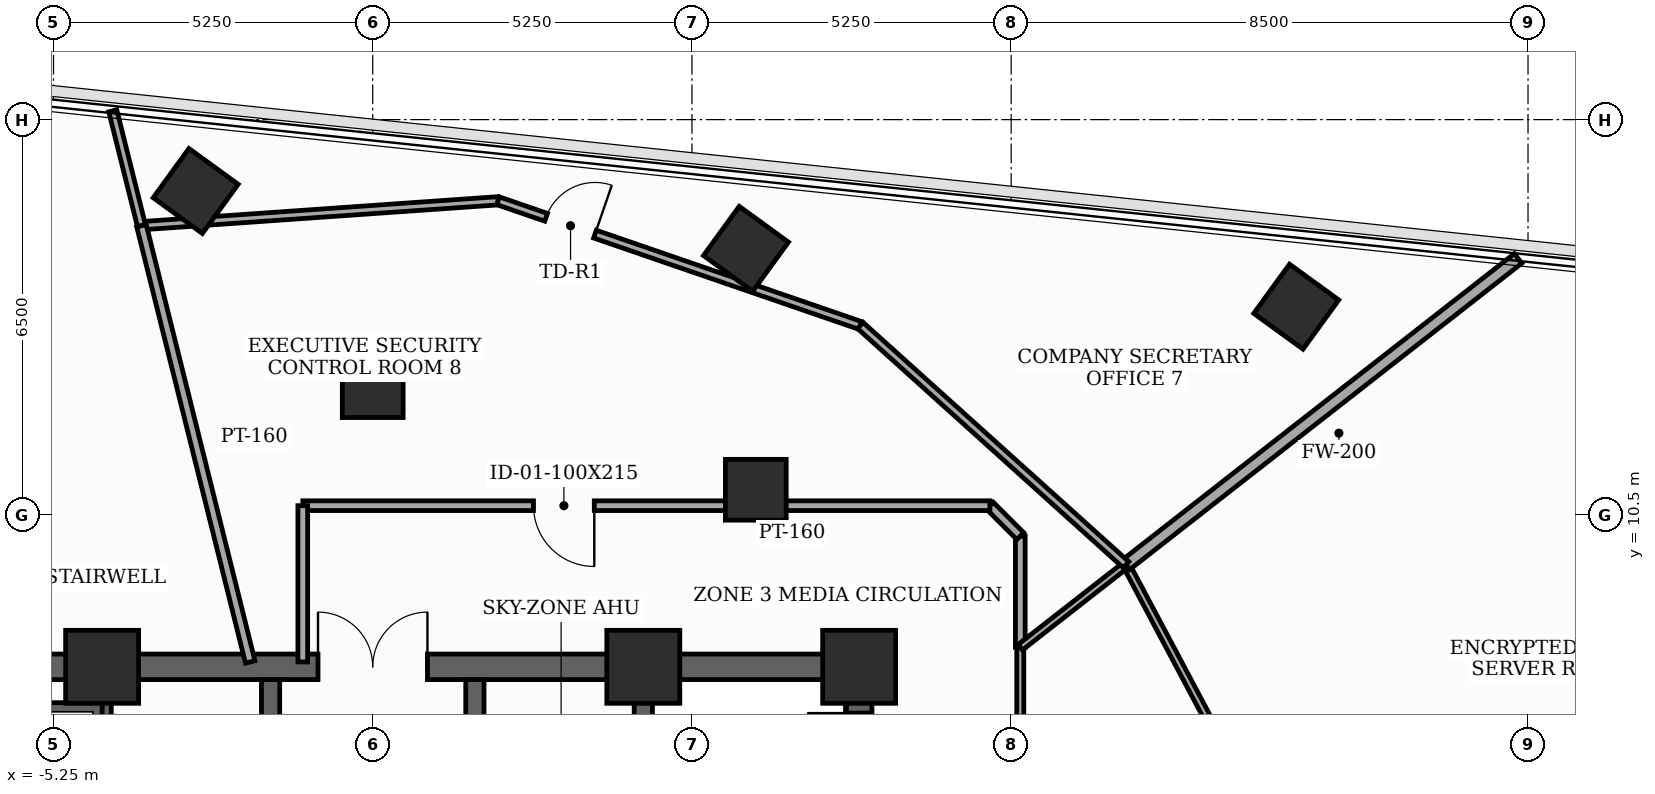
"""IFC4 building model, lengths in metres.
Left out: names, types, materials, properties, quantities, classifications, styles, units other than length and angle.
Written with IfcOpenShell. Run it as: python <this file> out.ifc"""

import sys

from ifc_helpers import new_model, si_unit, direction, frame, frame_2d, origin, origin_2d, place, context, subcontext, project, spatial, rectangle, extrude, element, fill, save


model = new_model("IFC4")
c1 = context("Model", 3, precision=1e-05, world=origin(), true_north=direction((0.0, 1.0)))
c2 = subcontext(c1, "Body", "Model", "MODEL_VIEW")
j1 = project(units=[si_unit("LENGTHUNIT", "METRE"), si_unit("PLANEANGLEUNIT", "RADIAN")], contexts=[c1])
p1 = place(None, origin())
s1 = spatial("IfcSite", under=j1, at=p1, CompositionType="ELEMENT")
p2 = place(p1, origin())
s2 = spatial("IfcBuilding", under=s1, at=p2, CompositionType="ELEMENT")
p3 = place(p2, frame((0.0, 0.0, 222.6)))
s3 = spatial("IfcBuildingStorey", under=s2, at=p3, CompositionType="ELEMENT", Elevation=222.6)
for number, where, z_axis, x_axis in (
    (1, (8.0, 8.0, 0.0), (0.0, 0.0, 1.0), (1.0, 0.0, 0.0)),
    (2, (4.45, 8.0, 0.0), (0.0, 0.0, 1.0), (1.0, 0.0, 0.0)),
    (3, (-4.45, 8.0, 0.0), (0.0, 0.0, 1.0), (1.0, 0.0, 0.0)),
):
    element("IfcColumn", number, at=place(p3, frame(where, z_axis=z_axis, x_axis=x_axis)), inside=s3, PredefinedType="COLUMN", context=c2, shape_type="SweptSolid", body=[
        extrude(rectangle(XDim=1.2, YDim=1.2, at=origin_2d()), origin(), (0.0, 0.0, 1.0), 3.7),
    ])
for number, where, z_axis, x_axis in (
    (4, (6.3, 10.912, 0.0), (0.0, 0.0, 1.0), (1.0, 0.0, 0.0)),
    (5, (0.0, 12.6, 0.0), (0.0, 0.0, 1.0), (1.0, 0.0, 0.0)),
    (6, (15.188, 13.923, 0.0), (0.0, 0.0, 1.0), (0.588, 0.809, 0.0)),
    (7, (6.138, 14.875, 0.0), (0.0, 0.0, 1.0), (0.588, 0.809, 0.0)),
    (8, (-2.912, 15.826, 0.0), (0.0, 0.0, 1.0), (0.588, 0.809, 0.0)),
):
    element("IfcColumn", number, at=place(p3, frame(where, z_axis=z_axis, x_axis=x_axis)), inside=s3, PredefinedType="COLUMN", context=c2, shape_type="SweptSolid", body=[
        extrude(rectangle(XDim=1.0, YDim=1.0, at=origin_2d()), origin(), (0.0, 0.0, 1.0), 3.7),
    ])
p4 = place(p3, frame((8.0, -8.0, 0.0), z_axis=(0.0, 0.0, 1.0), x_axis=(0.0, 1.0, 0.0)))
e9 = element("IfcWall", 9, at=p4, inside=s3, PredefinedType="SHEAR", context=c2, shape_type="SweptSolid", body=[
    extrude(rectangle(XDim=16.0, YDim=0.42, at=frame_2d((8.0, 0.0))), origin(), (0.0, 0.0, 1.0), 3.5),
])
p5 = place(p4, frame((9.6, 0.0, 0.0)))
e10 = element("IfcOpeningElement", 10, at=p5, cuts=e9, PredefinedType="OPENING", context=c2, shape_type="SweptSolid", body=[
    extrude(rectangle(XDim=1.05, YDim=2.15, at=frame_2d((0.525, 1.075))), frame((0.0, 0.22, 0.0), z_axis=(0.0, -1.0, 0.0), x_axis=(1.0, 0.0, 0.0)), (0.0, 0.0, 1.0), 0.44),
])
p6 = place(p4, frame((14.389, 0.0, 0.0)))
e11 = element("IfcOpeningElement", 11, at=p6, cuts=e9, PredefinedType="OPENING", context=c2, shape_type="SweptSolid", body=[
    extrude(rectangle(XDim=0.85, YDim=2.02, at=frame_2d((0.425, 1.01))), frame((0.0, 0.22, 0.0), z_axis=(0.0, -1.0, 0.0), x_axis=(1.0, 0.0, 0.0)), (0.0, 0.0, 1.0), 0.44),
])
p7 = place(p3, frame((-8.0, 8.0, 0.0), z_axis=(0.0, 0.0, 1.0), x_axis=(1.0, 0.0, 0.0)))
e12 = element("IfcWall", 12, at=p7, inside=s3, PredefinedType="SHEAR", context=c2, shape_type="SweptSolid", body=[
    extrude(rectangle(XDim=16.0, YDim=0.42, at=frame_2d((8.0, 0.0))), origin(), (0.0, 0.0, 1.0), 3.5),
])
p8 = place(p7, frame((7.1, 0.0, 0.0)))
e13 = element("IfcOpeningElement", 13, at=p8, cuts=e12, PredefinedType="OPENING", context=c2, shape_type="SweptSolid", body=[
    extrude(rectangle(XDim=1.8, YDim=2.15, at=frame_2d((0.9, 1.075))), frame((0.0, 0.22, 0.0), z_axis=(0.0, -1.0, 0.0), x_axis=(1.0, 0.0, 0.0)), (0.0, 0.0, 1.0), 0.44),
])
for number, where, z_axis, x_axis in (
    (14, (-4.45, -7.79, 0.0), (0.0, 0.0, 1.0), (0.0, 1.0, 0.0)),
    (15, (4.45, -7.79, 0.0), (0.0, 0.0, 1.0), (0.0, 1.0, 0.0)),
):
    element("IfcWall", number, at=place(p3, frame(where, z_axis=z_axis, x_axis=x_axis)), inside=s3, PredefinedType="SHEAR", context=c2, shape_type="SweptSolid", body=[
        extrude(rectangle(XDim=15.58, YDim=0.3, at=frame_2d((7.79, 0.0))), origin(), (0.0, 0.0, 1.0), 3.5),
    ])
p9 = place(p3, frame((-7.79, 7.26, 0.0), z_axis=(0.0, 0.0, 1.0), x_axis=(1.0, 0.0, 0.0)))
e16 = element("IfcWall", 16, at=p9, inside=s3, PredefinedType="SHEAR", context=c2, shape_type="SweptSolid", body=[
    extrude(rectangle(XDim=3.34, YDim=0.3, at=frame_2d((1.67, 0.0))), origin(), (0.0, 0.0, 1.0), 3.5),
])
p10 = place(p3, frame((-1.68, -4.85, 0.0), z_axis=(0.0, 0.0, 1.0), x_axis=(0.0, 1.0, 0.0)))
e17 = element("IfcWall", 17, at=p10, inside=s3, PredefinedType="SHEAR", context=c2, shape_type="SweptSolid", body=[
    extrude(rectangle(XDim=12.64, YDim=0.3, at=frame_2d((6.32, 0.0))), origin(), (0.0, 0.0, 1.0), 3.5),
])
p11 = place(p10, frame((2.6, 0.0, 0.0)))
e18 = element("IfcOpeningElement", 18, at=p11, cuts=e17, PredefinedType="OPENING", context=c2, shape_type="SweptSolid", body=[
    extrude(rectangle(XDim=0.95, YDim=2.1, at=frame_2d((0.475, 1.05))), frame((0.0, 0.16, 0.0), z_axis=(0.0, -1.0, 0.0), x_axis=(1.0, 0.0, 0.0)), (0.0, 0.0, 1.0), 0.32),
])
p12 = place(p10, frame((8.8, 0.0, 0.0)))
e19 = element("IfcOpeningElement", 19, at=p12, cuts=e17, PredefinedType="OPENING", context=c2, shape_type="SweptSolid", body=[
    extrude(rectangle(XDim=0.95, YDim=2.1, at=frame_2d((0.475, 1.05))), frame((0.0, 0.16, 0.0), z_axis=(0.0, -1.0, 0.0), x_axis=(1.0, 0.0, 0.0)), (0.0, 0.0, 1.0), 0.32),
])
p13 = place(p3, frame((1.68, -4.85, 0.0), z_axis=(0.0, 0.0, 1.0), x_axis=(0.0, 1.0, 0.0)))
e20 = element("IfcWall", 20, at=p13, inside=s3, PredefinedType="SHEAR", context=c2, shape_type="SweptSolid", body=[
    extrude(rectangle(XDim=12.64, YDim=0.3, at=frame_2d((6.32, 0.0))), origin(), (0.0, 0.0, 1.0), 3.5),
])
p14 = place(p13, frame((0.55, 0.0, 0.0)))
e21 = element("IfcOpeningElement", 21, at=p14, cuts=e20, PredefinedType="OPENING", context=c2, shape_type="SweptSolid", body=[
    extrude(rectangle(XDim=1.1, YDim=2.1, at=frame_2d((0.55, 1.05))), frame((0.0, 0.16, 0.0), z_axis=(0.0, -1.0, 0.0), x_axis=(1.0, 0.0, 0.0)), (0.0, 0.0, 1.0), 0.32),
])
p15 = place(p13, frame((2.65, 0.0, 0.0)))
e22 = element("IfcOpeningElement", 22, at=p15, cuts=e20, PredefinedType="OPENING", context=c2, shape_type="SweptSolid", body=[
    extrude(rectangle(XDim=1.1, YDim=2.1, at=frame_2d((0.55, 1.05))), frame((0.0, 0.16, 0.0), z_axis=(0.0, -1.0, 0.0), x_axis=(1.0, 0.0, 0.0)), (0.0, 0.0, 1.0), 0.32),
])
p16 = place(p13, frame((4.75, 0.0, 0.0)))
e23 = element("IfcOpeningElement", 23, at=p16, cuts=e20, PredefinedType="OPENING", context=c2, shape_type="SweptSolid", body=[
    extrude(rectangle(XDim=1.1, YDim=2.1, at=frame_2d((0.55, 1.05))), frame((0.0, 0.16, 0.0), z_axis=(0.0, -1.0, 0.0), x_axis=(1.0, 0.0, 0.0)), (0.0, 0.0, 1.0), 0.32),
])
p17 = place(p13, frame((8.9, 0.0, 0.0)))
e24 = element("IfcOpeningElement", 24, at=p17, cuts=e20, PredefinedType="OPENING", context=c2, shape_type="SweptSolid", body=[
    extrude(rectangle(XDim=0.95, YDim=2.1, at=frame_2d((0.475, 1.05))), frame((0.0, 0.16, 0.0), z_axis=(0.0, -1.0, 0.0), x_axis=(1.0, 0.0, 0.0)), (0.0, 0.0, 1.0), 0.32),
])
p18 = place(p3, frame((10.65, 4.225, 0.0), z_axis=(0.0, 0.0, 1.0), x_axis=(0.0, 1.0, 0.0)))
e25 = element("IfcWall", 25, at=p18, inside=s3, PredefinedType="PARTITIONING", context=c2, shape_type="SweptSolid", body=[
    extrude(rectangle(XDim=4.096, YDim=0.115, at=frame_2d((2.048, 0.0))), origin(), (0.0, 0.0, 1.0), 2.885),
])
p19 = place(p3, frame((10.65, 8.321, 0.0), z_axis=(0.0, 0.0, 1.0), x_axis=(0.0, 1.0, 0.0)))
e26 = element("IfcWall", 26, at=p19, inside=s3, PredefinedType="PARTITIONING", context=c2, shape_type="SweptSolid", body=[
    extrude(rectangle(XDim=1.829, YDim=0.16, at=frame_2d((0.915, 0.0))), origin(), (0.0, 0.0, 1.0), 3.5),
])
p20 = place(p3, frame((10.65, 10.15, 0.0), z_axis=(0.0, 0.0, 1.0), x_axis=(-0.707106781187, 0.707106781187, 0.0)))
e27 = element("IfcWall", 27, at=p20, inside=s3, PredefinedType="PARTITIONING", context=c2, shape_type="SweptSolid", body=[
    extrude(rectangle(XDim=0.707, YDim=0.16, at=frame_2d((0.354, 0.0))), origin(), (0.0, 0.0, 1.0), 3.5),
])
p21 = place(p3, frame((10.15, 10.65, 0.0), z_axis=(0.0, 0.0, 1.0), x_axis=(-1.0, 0.0, 0.0)))
e28 = element("IfcWall", 28, at=p21, inside=s3, PredefinedType="PARTITIONING", context=c2, shape_type="SweptSolid", body=[
    extrude(rectangle(XDim=11.3, YDim=0.16, at=frame_2d((5.65, 0.0))), origin(), (0.0, 0.0, 1.0), 2.885),
])
p22 = place(p21, frame((6.506, 0.0, 0.0)))
e29 = element("IfcOpeningElement", 29, at=p22, cuts=e28, PredefinedType="OPENING", context=c2, shape_type="SweptSolid", body=[
    extrude(rectangle(XDim=1.0, YDim=2.15, at=frame_2d((0.5, 1.075))), frame((0.0, 0.09, 0.0), z_axis=(0.0, -1.0, 0.0), x_axis=(1.0, 0.0, 0.0)), (0.0, 0.0, 1.0), 0.18),
])
p23 = place(p3, frame((-1.15, 10.65, 0.0), z_axis=(0.0, 0.0, 1.0), x_axis=(0.0, -1.0, 0.0)))
e30 = element("IfcWall", 30, at=p23, inside=s3, PredefinedType="PARTITIONING", context=c2, shape_type="SweptSolid", body=[
    extrude(rectangle(XDim=2.57, YDim=0.16, at=frame_2d((1.285, 0.0))), origin(), (0.0, 0.0, 1.0), 2.885),
])
p24 = place(p3, frame((15.149, 4.487, 0.0), z_axis=(0.0, 0.0, 1.0), x_axis=(-0.469396049876, 0.882987739643, 0.0)))
e31 = element("IfcWall", 31, at=p24, inside=s3, PredefinedType="PARTITIONING", context=c2, shape_type="SweptSolid", body=[
    extrude(rectangle(XDim=5.88, YDim=0.115, at=frame_2d((2.94, 0.0))), origin(), (0.0, 0.0, 1.0), 2.985),
])
p25 = place(p3, frame((12.389, 9.679, 0.0), z_axis=(0.0, 0.0, 1.0), x_axis=(-0.788177008199, -0.615448619908, 0.0)))
e32 = element("IfcWall", 32, at=p25, inside=s3, PredefinedType="PARTITIONING", context=c2, shape_type="SweptSolid", body=[
    extrude(rectangle(XDim=2.206, YDim=0.115, at=frame_2d((1.103, 0.0))), origin(), (0.0, 0.0, 1.0), 3.5),
])
p26 = place(p3, frame((18.836, 14.716, 0.0), z_axis=(0.0, 0.0, 1.0), x_axis=(-0.78799903942, -0.615676468507, 0.0)))
e33 = element("IfcWall", 33, at=p26, inside=s3, PredefinedType="SOLIDWALL", context=c2, shape_type="SweptSolid", body=[
    extrude(rectangle(XDim=8.182, YDim=0.2, at=frame_2d((4.091, 0.0))), origin(), (0.0, 0.0, 1.0), 2.985),
])
p27 = place(p3, frame((-3.803, 15.255, 0.0), z_axis=(0.0, 0.0, 1.0), x_axis=(0.997563622011, 0.069762597718, 0.0)))
e34 = element("IfcWall", 34, at=p27, inside=s3, PredefinedType="PARTITIONING", context=c2, shape_type="SweptSolid", body=[
    extrude(rectangle(XDim=5.879, YDim=0.135, at=frame_2d((2.94, 0.0))), origin(), (0.0, 0.0, 1.0), 2.985),
])
p28 = place(p3, frame((2.062, 15.665, 0.0), z_axis=(0.0, 0.0, 1.0), x_axis=(0.94552565825, -0.32554758422, 0.0)))
e35 = element("IfcWall", 35, at=p28, inside=s3, PredefinedType="PARTITIONING", context=c2, shape_type="SweptSolid", body=[
    extrude(rectangle(XDim=6.3, YDim=0.135, at=frame_2d((3.15, 0.0))), origin(), (0.0, 0.0, 1.0), 2.985),
])
p29 = place(p28, frame((0.835, 0.0, 0.0)))
e36 = element("IfcOpeningElement", 36, at=p29, cuts=e35, PredefinedType="OPENING", context=c2, shape_type="SweptSolid", body=[
    extrude(rectangle(XDim=0.85, YDim=2.02, at=frame_2d((0.425, 1.01))), frame((0.0, 0.077, 0.0), z_axis=(0.0, -1.0, 0.0), x_axis=(1.0, 0.0, 0.0)), (0.0, 0.0, 1.0), 0.155),
])
p30 = place(p3, frame((8.019, 13.614, 0.0), z_axis=(0.0, 0.0, 1.0), x_axis=(0.743110388877, -0.669168850099, 0.0)))
e37 = element("IfcWall", 37, at=p30, inside=s3, PredefinedType="PARTITIONING", context=c2, shape_type="SweptSolid", body=[
    extrude(rectangle(XDim=5.881, YDim=0.135, at=frame_2d((2.94, 0.0))), origin(), (0.0, 0.0, 1.0), 3.5),
])
p31 = place(p3, frame((-4.275, 17.146, 0.0), z_axis=(0.0, 0.0, 1.0), x_axis=(0.242417712213, -0.970171970738, 0.0)))
e38 = element("IfcWall", 38, at=p31, inside=s3, PredefinedType="PARTITIONING", context=c2, shape_type="SweptSolid", body=[
    extrude(rectangle(XDim=1.949, YDim=0.135, at=frame_2d((0.974, 0.0))), origin(), (0.0, 0.0, 1.0), 3.035),
])
p32 = place(p3, frame((-3.803, 15.255, 0.0), z_axis=(0.0, 0.0, 1.0), x_axis=(0.241851911951, -0.970313172479, 0.0)))
e39 = element("IfcWall", 39, at=p32, inside=s3, PredefinedType="PARTITIONING", context=c2, shape_type="SweptSolid", body=[
    extrude(rectangle(XDim=7.394, YDim=0.16, at=frame_2d((3.697, 0.0))), origin(), (0.0, 0.0, 1.0), 2.885),
])
p33 = place(p6, origin())
e40 = element("IfcDoor", 40, at=p33, inside=s3, OperationType="SINGLE_SWING_RIGHT", PredefinedType="TRAPDOOR", context=c2, shape_type="SweptSolid", body=[
    extrude(rectangle(XDim=0.85, YDim=2.02, at=frame_2d((0.425, 1.01))), frame((0.0, 0.025, 0.0), z_axis=(0.0, -1.0, 0.0), x_axis=(1.0, 0.0, 0.0)), (0.0, 0.0, 1.0), 0.05),
])
fill(e11, e40)
p34 = place(p8, origin())
e41 = element("IfcDoor", 41, at=p34, inside=s3, OperationType="DOUBLE_DOOR_SINGLE_SWING", PredefinedType="DOOR", context=c2, shape_type="SweptSolid", body=[
    extrude(rectangle(XDim=1.8, YDim=2.15, at=frame_2d((0.9, 1.075))), frame((0.0, 0.025, 0.0), z_axis=(0.0, -1.0, 0.0), x_axis=(1.0, 0.0, 0.0)), (0.0, 0.0, 1.0), 0.05),
])
fill(e13, e41)
p35 = place(p22, origin())
e42 = element("IfcDoor", 42, at=p35, inside=s3, OperationType="SINGLE_SWING_LEFT", PredefinedType="DOOR", context=c2, shape_type="SweptSolid", body=[
    extrude(rectangle(XDim=1.0, YDim=2.15, at=frame_2d((0.5, 1.075))), frame((0.0, 0.025, 0.0), z_axis=(0.0, -1.0, 0.0), x_axis=(1.0, 0.0, 0.0)), (0.0, 0.0, 1.0), 0.05),
])
fill(e29, e42)
p36 = place(p29, origin())
e43 = element("IfcDoor", 43, at=p36, inside=s3, OperationType="SINGLE_SWING_RIGHT", PredefinedType="TRAPDOOR", context=c2, shape_type="SweptSolid", body=[
    extrude(rectangle(XDim=0.85, YDim=2.02, at=frame_2d((0.425, 1.01))), frame((0.0, 0.025, 0.0), z_axis=(0.0, -1.0, 0.0), x_axis=(1.0, 0.0, 0.0)), (0.0, 0.0, 1.0), 0.05),
])
fill(e36, e43)
save(model, sys.argv[1])
